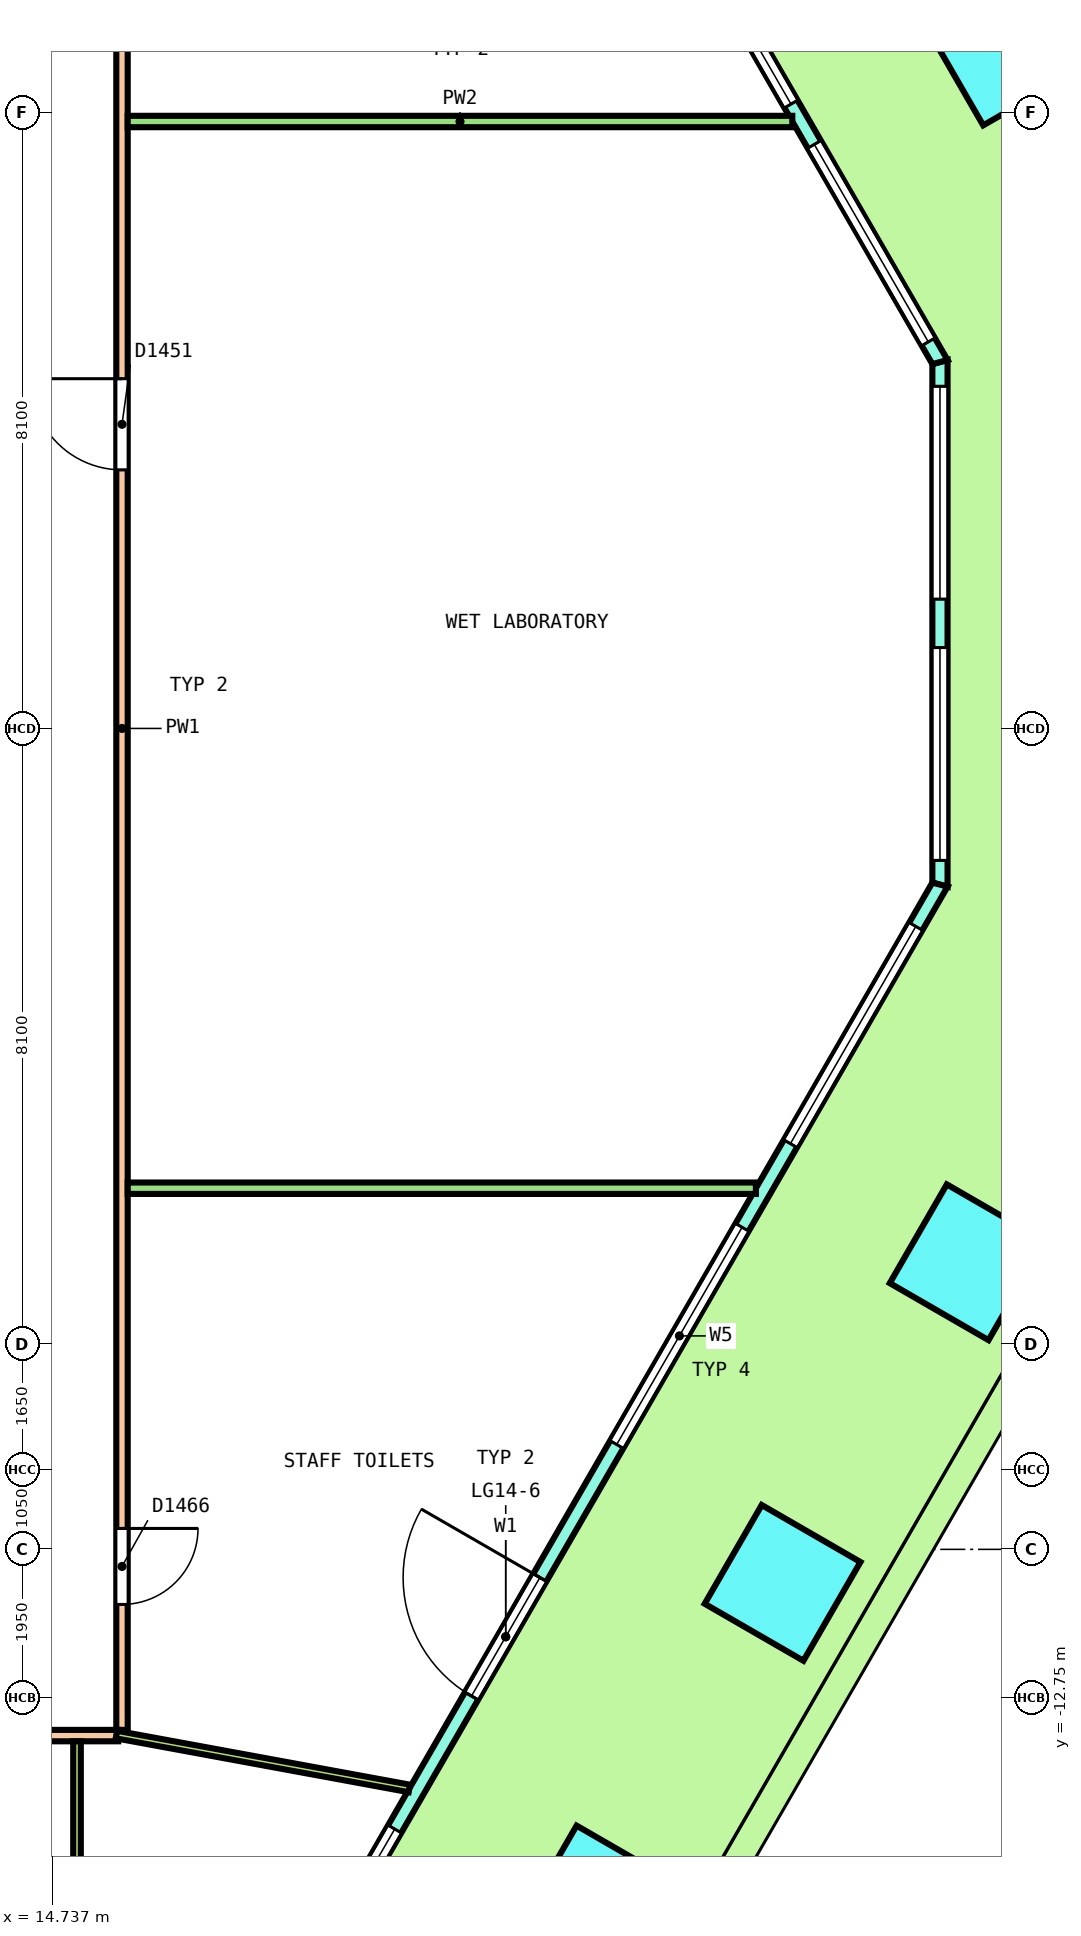
"""IFC4 building model, lengths in metres.
Left out: names, types, materials, properties, quantities, classifications, styles, units other than length and angle.
Written with IfcOpenShell. Run it as: python <this file> out.ifc"""

import sys

from ifc_helpers import new_model, si_unit, direction, frame, frame_2d, origin, origin_2d, place, context, subcontext, project, spatial, polyline, rectangle, outline, extrude, element, fill, save


model = new_model("IFC4")
c1 = context("Model", 3, precision=1e-05, world=origin(), true_north=direction((0.0, 1.0)))
c2 = subcontext(c1, "Body", "Model", "MODEL_VIEW")
j1 = project(units=[si_unit("LENGTHUNIT", "METRE"), si_unit("PLANEANGLEUNIT", "RADIAN")], contexts=[c1])
p1 = place(None, origin())
s1 = spatial("IfcSite", under=j1, at=p1, CompositionType="ELEMENT")
p2 = place(p1, origin())
s2 = spatial("IfcBuilding", under=s1, at=p2, CompositionType="ELEMENT")
p3 = place(p2, frame((0.0, 0.0, 63.0)))
s3 = spatial("IfcBuildingStorey", under=s2, at=p3, CompositionType="ELEMENT", Elevation=63.0)
p4 = place(p3, frame((27.255, 8.959, 0.0), z_axis=(0.0, 0.0, 1.0), x_axis=(-0.5, 0.866025403784, 0.0)))
e1 = element("IfcColumn", 1, at=p4, inside=s3, PredefinedType="COLUMN", context=c2, shape_type="SweptSolid", body=[
    extrude(rectangle(XDim=1.5, YDim=1.5, at=origin_2d()), origin(), (0.0, 0.0, 1.0), 4.04),
])
for number, where, z_axis, x_axis in (
    (2, (21.905, -15.459, 0.0), (0.0, 0.0, 1.0), (0.5, 0.866, 0.0)),
    (3, (24.341, -11.241, 0.0), (0.0, 0.0, 1.0), (0.5, 0.866, 0.0)),
):
    element("IfcColumn", number, at=place(p3, frame(where, z_axis=z_axis, x_axis=x_axis)), inside=s3, PredefinedType="COLUMN", context=c2, shape_type="SweptSolid", body=[
        extrude(rectangle(XDim=1.5, YDim=1.5, at=origin_2d()), origin(), (0.0, 0.0, 1.0), 4.05),
    ])
p5 = place(p3, frame((26.776, -7.023, 0.0), z_axis=(0.0, 0.0, 1.0), x_axis=(0.5, 0.866025403784, 0.0)))
e4 = element("IfcColumn", 4, at=p5, inside=s3, PredefinedType="COLUMN", context=c2, shape_type="SweptSolid", body=[
    extrude(rectangle(XDim=1.5, YDim=1.5, at=origin_2d()), origin(), (0.0, 0.0, 1.0), 4.04),
])
p6 = place(p3, frame((26.411, -2.055, 0.0), z_axis=(0.0, 0.0, 1.0), x_axis=(0.0, 1.0, 0.0)))
e5 = element("IfcWall", 5, at=p6, inside=s3, PredefinedType="SOLIDWALL", context=c2, shape_type="SweptSolid", body=[
    extrude(outline(polyline([(-0.027, -0.1), (1.128, -0.1), (2.283, -0.1), (3.438, -0.1), (4.592, -0.1), (5.747, -0.1), (6.902, -0.1), (6.848, 0.1), (5.711, 0.1), (4.574, 0.1), (3.438, 0.1), (2.301, 0.1), (1.164, 0.1), (0.027, 0.1), (-0.027, -0.1)])), origin(), (0.0, 0.0, 1.0), 4.1),
])
p7 = place(p6, frame((0.319, 0.0, 0.1)))
e6 = element("IfcOpeningElement", 6, at=p7, cuts=e5, PredefinedType="OPENING", context=c2, shape_type="SweptSolid", body=[
    extrude(rectangle(XDim=2.8, YDim=2.9, at=frame_2d((1.4, 1.45))), frame((0.0, 0.11, 0.0), z_axis=(0.0, -1.0, 0.0), x_axis=(1.0, 0.0, 0.0)), (0.0, 0.0, 1.0), 0.22),
])
p8 = place(p6, frame((3.756, 0.0, 0.1)))
e7 = element("IfcOpeningElement", 7, at=p8, cuts=e5, PredefinedType="OPENING", context=c2, shape_type="SweptSolid", body=[
    extrude(rectangle(XDim=2.8, YDim=2.9, at=frame_2d((1.4, 1.45))), frame((0.0, 0.11, 0.0), z_axis=(0.0, -1.0, 0.0), x_axis=(1.0, 0.0, 0.0)), (0.0, 0.0, 1.0), 0.22),
])
p9 = place(p3, frame((26.411, 4.82, 0.0), z_axis=(0.0, 0.0, 1.0), x_axis=(-0.500000137386, 0.866025324465, 0.0)))
e8 = element("IfcWall", 8, at=p9, inside=s3, PredefinedType="SOLIDWALL", context=c2, shape_type="SweptSolid", body=[
    extrude(outline(polyline([(-0.027, -0.1), (0.979, -0.1), (1.986, -0.1), (2.992, -0.1), (3.999, -0.1), (5.005, -0.1), (6.012, -0.1), (7.018, -0.1), (8.025, -0.1), (9.031, -0.1), (10.038, -0.1), (11.044, -0.1), (12.051, -0.1), (13.057, -0.1), (14.063, -0.1), (15.07, -0.1), (16.076, -0.1), (17.083, -0.1), (18.089, -0.1), (18.036, 0.1), (17.035, 0.1), (16.035, 0.1), (15.034, 0.1), (14.034, 0.1), (13.033, 0.1), (12.033, 0.1), (11.032, 0.1), (10.032, 0.1), (9.031, 0.1), (8.031, 0.1), (7.03, 0.1), (6.03, 0.1), (5.029, 0.1), (4.029, 0.1), (3.028, 0.1), (2.028, 0.1), (1.027, 0.1), (0.027, 0.1), (-0.027, -0.1)])), origin(), (0.0, 0.0, 1.0), 4.1),
])
p10 = place(p9, frame((0.306, 0.0, 0.1)))
e9 = element("IfcOpeningElement", 9, at=p10, cuts=e8, PredefinedType="OPENING", context=c2, shape_type="SweptSolid", body=[
    extrude(rectangle(XDim=3.0, YDim=2.9, at=frame_2d((1.5, 1.45))), frame((0.0, 0.11, 0.0), z_axis=(0.0, -1.0, 0.0), x_axis=(1.0, 0.0, 0.0)), (0.0, 0.0, 1.0), 0.22),
])
p11 = place(p9, frame((3.919, 0.0, 0.1)))
e10 = element("IfcOpeningElement", 10, at=p11, cuts=e8, PredefinedType="OPENING", context=c2, shape_type="SweptSolid", body=[
    extrude(rectangle(XDim=3.0, YDim=2.9, at=frame_2d((1.5, 1.45))), frame((0.0, 0.11, 0.0), z_axis=(0.0, -1.0, 0.0), x_axis=(1.0, 0.0, 0.0)), (0.0, 0.0, 1.0), 0.22),
])
p12 = place(p9, frame((8.131, 0.0, 0.0)))
e11 = element("IfcOpeningElement", 11, at=p12, cuts=e8, PredefinedType="OPENING", context=c2, shape_type="SweptSolid", body=[
    extrude(rectangle(XDim=1.8, YDim=2.4, at=frame_2d((0.9, 1.2))), frame((0.0, 0.11, 0.0), z_axis=(0.0, -1.0, 0.0), x_axis=(1.0, 0.0, 0.0)), (0.0, 0.0, 1.0), 0.22),
])
p13 = place(p9, frame((8.131, 0.0, 2.55)))
e12 = element("IfcOpeningElement", 12, at=p13, cuts=e8, PredefinedType="OPENING", context=c2, shape_type="SweptSolid", body=[
    extrude(rectangle(XDim=1.8, YDim=0.45, at=frame_2d((0.9, 0.225))), frame((0.0, 0.11, 0.0), z_axis=(0.0, -1.0, 0.0), x_axis=(1.0, 0.0, 0.0)), (0.0, 0.0, 1.0), 0.22),
])
p14 = place(p9, frame((11.144, 0.0, 0.1)))
e13 = element("IfcOpeningElement", 13, at=p14, cuts=e8, PredefinedType="OPENING", context=c2, shape_type="SweptSolid", body=[
    extrude(rectangle(XDim=3.0, YDim=2.9, at=frame_2d((1.5, 1.45))), frame((0.0, 0.11, 0.0), z_axis=(0.0, -1.0, 0.0), x_axis=(1.0, 0.0, 0.0)), (0.0, 0.0, 1.0), 0.22),
])
p15 = place(p9, frame((14.756, 0.0, 0.1)))
e14 = element("IfcOpeningElement", 14, at=p15, cuts=e8, PredefinedType="OPENING", context=c2, shape_type="SweptSolid", body=[
    extrude(rectangle(XDim=3.0, YDim=2.9, at=frame_2d((1.5, 1.45))), frame((0.0, 0.11, 0.0), z_axis=(0.0, -1.0, 0.0), x_axis=(1.0, 0.0, 0.0)), (0.0, 0.0, 1.0), 0.22),
])
p16 = place(p3, frame((14.985, -21.845, 0.0), z_axis=(0.0, 0.0, 1.0), x_axis=(0.50000204422, 0.86602422355, 0.0)))
e15 = element("IfcWall", 15, at=p16, inside=s3, PredefinedType="SOLIDWALL", context=c2, shape_type="SweptSolid", body=[
    extrude(outline(polyline([(-0.027, -0.1), (1.014, -0.1), (2.055, -0.1), (3.097, -0.1), (4.138, -0.1), (5.179, -0.1), (6.22, -0.1), (7.261, -0.1), (8.303, -0.1), (9.344, -0.1), (10.385, -0.1), (11.426, -0.1), (12.468, -0.1), (13.509, -0.1), (14.55, -0.1), (15.591, -0.1), (16.632, -0.1), (17.673, -0.1), (18.715, -0.1), (19.756, -0.1), (20.797, -0.1), (21.838, -0.1), (22.879, -0.1), (22.826, 0.1), (21.789, 0.1), (20.753, 0.1), (19.717, 0.1), (18.68, 0.1), (17.644, 0.1), (16.608, 0.1), (15.572, 0.1), (14.535, 0.1), (13.499, 0.1), (12.463, 0.1), (11.426, 0.1), (10.39, 0.1), (9.354, 0.1), (8.317, 0.1), (7.281, 0.1), (6.245, 0.1), (5.208, 0.1), (4.172, 0.1), (3.136, 0.1), (2.099, 0.1), (1.063, 0.1), (0.027, 0.1), (-0.027, -0.1)])), origin(), (0.0, 0.0, 1.0), 4.1),
])
p17 = place(p16, frame((0.635, 0.0, 0.1)))
e16 = element("IfcOpeningElement", 16, at=p17, cuts=e15, PredefinedType="OPENING", context=c2, shape_type="SweptSolid", body=[
    extrude(rectangle(XDim=3.3, YDim=2.9, at=frame_2d((1.65, 1.45))), frame((0.0, 0.11, 0.0), z_axis=(0.0, -1.0, 0.0), x_axis=(1.0, 0.0, 0.0)), (0.0, 0.0, 1.0), 0.22),
])
p18 = place(p16, frame((5.206, 0.0, 0.1)))
e17 = element("IfcOpeningElement", 17, at=p18, cuts=e15, PredefinedType="OPENING", context=c2, shape_type="SweptSolid", body=[
    extrude(rectangle(XDim=3.3, YDim=2.9, at=frame_2d((1.65, 1.45))), frame((0.0, 0.11, 0.0), z_axis=(0.0, -1.0, 0.0), x_axis=(1.0, 0.0, 0.0)), (0.0, 0.0, 1.0), 0.22),
])
p19 = place(p16, frame((10.526, 0.0, 0.0)))
e18 = element("IfcOpeningElement", 18, at=p19, cuts=e15, PredefinedType="OPENING", context=c2, shape_type="SweptSolid", body=[
    extrude(rectangle(XDim=1.8, YDim=2.4, at=frame_2d((0.9, 1.2))), frame((0.0, 0.11, 0.0), z_axis=(0.0, -1.0, 0.0), x_axis=(1.0, 0.0, 0.0)), (0.0, 0.0, 1.0), 0.22),
])
p20 = place(p16, frame((10.526, 0.0, 2.55)))
e19 = element("IfcOpeningElement", 19, at=p20, cuts=e15, PredefinedType="OPENING", context=c2, shape_type="SweptSolid", body=[
    extrude(rectangle(XDim=1.8, YDim=0.45, at=frame_2d((0.9, 0.225))), frame((0.0, 0.11, 0.0), z_axis=(0.0, -1.0, 0.0), x_axis=(1.0, 0.0, 0.0)), (0.0, 0.0, 1.0), 0.22),
])
p21 = place(p16, frame((14.347, 0.0, 0.1)))
e20 = element("IfcOpeningElement", 20, at=p21, cuts=e15, PredefinedType="OPENING", context=c2, shape_type="SweptSolid", body=[
    extrude(rectangle(XDim=3.3, YDim=2.9, at=frame_2d((1.65, 1.45))), frame((0.0, 0.11, 0.0), z_axis=(0.0, -1.0, 0.0), x_axis=(1.0, 0.0, 0.0)), (0.0, 0.0, 1.0), 0.22),
])
p22 = place(p16, frame((18.917, 0.0, 0.1)))
e21 = element("IfcOpeningElement", 21, at=p22, cuts=e15, PredefinedType="OPENING", context=c2, shape_type="SweptSolid", body=[
    extrude(rectangle(XDim=3.3, YDim=2.9, at=frame_2d((1.65, 1.45))), frame((0.0, 0.11, 0.0), z_axis=(0.0, -1.0, 0.0), x_axis=(1.0, 0.0, 0.0)), (0.0, 0.0, 1.0), 0.22),
])
p23 = place(p3, frame((15.65, -13.175, 0.0), z_axis=(0.0, 0.0, 1.0), x_axis=(0.0, 1.0, 0.0)))
e22 = element("IfcWall", 22, at=p23, inside=s3, PredefinedType="PARTITIONING", context=c2, shape_type="SweptSolid", body=[
    extrude(rectangle(XDim=26.35, YDim=0.15, at=frame_2d((13.175, 0.0))), origin(), (0.0, 0.0, 1.0), 3.05),
])
p24 = place(p23, frame((16.576, 0.0, 0.0)))
e23 = element("IfcOpeningElement", 23, at=p24, cuts=e22, PredefinedType="OPENING", context=c2, shape_type="SweptSolid", body=[
    extrude(rectangle(XDim=1.2, YDim=2.1, at=frame_2d((0.6, 1.05))), frame((0.0, 0.085, 0.0), z_axis=(0.0, -1.0, 0.0), x_axis=(1.0, 0.0, 0.0)), (0.0, 0.0, 1.0), 0.17),
])
p25 = place(p23, frame((22.401, 0.0, 0.0)))
e24 = element("IfcOpeningElement", 24, at=p25, cuts=e22, PredefinedType="OPENING", context=c2, shape_type="SweptSolid", body=[
    extrude(rectangle(XDim=1.0, YDim=2.1, at=frame_2d((0.5, 1.05))), frame((0.0, 0.085, 0.0), z_axis=(0.0, -1.0, 0.0), x_axis=(1.0, 0.0, 0.0)), (0.0, 0.0, 1.0), 0.17),
])
p26 = place(p23, frame((1.65, 0.0, 0.0)))
e25 = element("IfcOpeningElement", 25, at=p26, cuts=e22, PredefinedType="OPENING", context=c2, shape_type="SweptSolid", body=[
    extrude(rectangle(XDim=1.0, YDim=2.1, at=frame_2d((0.5, 1.05))), frame((0.0, 0.085, 0.0), z_axis=(0.0, -1.0, 0.0), x_axis=(1.0, 0.0, 0.0)), (0.0, 0.0, 1.0), 0.17),
])
p27 = place(p3, frame((-15.725, -13.25, 0.0), z_axis=(0.0, 0.0, 1.0), x_axis=(1.0, 0.0, 0.0)))
e26 = element("IfcWall", 26, at=p27, inside=s3, PredefinedType="PARTITIONING", context=c2, shape_type="SweptSolid", body=[
    extrude(rectangle(XDim=31.325, YDim=0.15, at=frame_2d((15.663, 0.0))), origin(), (0.0, 0.0, 1.0), 3.05),
])
p28 = place(p27, frame((0.898, 0.0, 0.0)))
e27 = element("IfcOpeningElement", 27, at=p28, cuts=e26, PredefinedType="OPENING", context=c2, shape_type="SweptSolid", body=[
    extrude(rectangle(XDim=1.0, YDim=2.1, at=frame_2d((0.5, 1.05))), frame((0.0, 0.085, 0.0), z_axis=(0.0, -1.0, 0.0), x_axis=(1.0, 0.0, 0.0)), (0.0, 0.0, 1.0), 0.17),
])
p29 = place(p27, frame((5.198, 0.0, 0.0)))
e28 = element("IfcOpeningElement", 28, at=p29, cuts=e26, PredefinedType="OPENING", context=c2, shape_type="SweptSolid", body=[
    extrude(rectangle(XDim=1.2, YDim=2.1, at=frame_2d((0.6, 1.05))), frame((0.0, 0.085, 0.0), z_axis=(0.0, -1.0, 0.0), x_axis=(1.0, 0.0, 0.0)), (0.0, 0.0, 1.0), 0.17),
])
p30 = place(p27, frame((14.115, 0.0, 0.0)))
e29 = element("IfcOpeningElement", 29, at=p30, cuts=e26, PredefinedType="OPENING", context=c2, shape_type="SweptSolid", body=[
    extrude(rectangle(XDim=1.2, YDim=2.1, at=frame_2d((0.6, 1.05))), frame((0.0, 0.085, 0.0), z_axis=(0.0, -1.0, 0.0), x_axis=(1.0, 0.0, 0.0)), (0.0, 0.0, 1.0), 0.17),
])
p31 = place(p27, frame((22.046, 0.0, 0.0)))
e30 = element("IfcOpeningElement", 30, at=p31, cuts=e26, PredefinedType="OPENING", context=c2, shape_type="SweptSolid", body=[
    extrude(rectangle(XDim=1.0, YDim=2.1, at=frame_2d((0.5, 1.05))), frame((0.0, 0.085, 0.0), z_axis=(0.0, -1.0, 0.0), x_axis=(1.0, 0.0, 0.0)), (0.0, 0.0, 1.0), 0.17),
])
p32 = place(p27, frame((28.358, 0.0, 0.0)))
e31 = element("IfcOpeningElement", 31, at=p32, cuts=e26, PredefinedType="OPENING", context=c2, shape_type="SweptSolid", body=[
    extrude(rectangle(XDim=1.0, YDim=2.1, at=frame_2d((0.5, 1.05))), frame((0.0, 0.085, 0.0), z_axis=(0.0, -1.0, 0.0), x_axis=(1.0, 0.0, 0.0)), (0.0, 0.0, 1.0), 0.17),
])
p33 = place(p3, frame((15.725, 7.985, 0.0), z_axis=(0.0, 0.0, 1.0), x_axis=(1.0, 0.0, 0.0)))
e32 = element("IfcWall", 32, at=p33, inside=s3, PredefinedType="PARTITIONING", context=c2, shape_type="SweptSolid", body=[
    extrude(rectangle(XDim=8.743, YDim=0.15, at=frame_2d((4.372, 0.0))), origin(), (0.0, 0.0, 1.0), 3.05),
])
p34 = place(p3, frame((15.725, -6.049, 0.0), z_axis=(0.0, 0.0, 1.0), x_axis=(1.0, 0.0, 0.0)))
e33 = element("IfcWall", 33, at=p34, inside=s3, PredefinedType="PARTITIONING", context=c2, shape_type="SweptSolid", body=[
    extrude(rectangle(XDim=8.264, YDim=0.15, at=frame_2d((4.132, 0.0))), origin(), (0.0, 0.0, 1.0), 3.05),
])
p35 = place(p3, frame((15.058, -21.519, 0.0), z_axis=(0.0, 0.0, 1.0), x_axis=(0.0, 1.0, 0.0)))
e34 = element("IfcWall", 34, at=p35, inside=s3, PredefinedType="PARTITIONING", context=c2, shape_type="SweptSolid", body=[
    extrude(rectangle(XDim=8.194, YDim=0.1, at=frame_2d((4.097, 0.0))), origin(), (0.0, 0.0, 1.0), 3.05),
])
p36 = place(p35, frame((2.649, 0.0, 0.0)))
e35 = element("IfcOpeningElement", 35, at=p36, cuts=e34, PredefinedType="OPENING", context=c2, shape_type="SweptSolid", body=[
    extrude(rectangle(XDim=1.0, YDim=2.1, at=frame_2d((0.5, 1.05))), frame((0.0, 0.06, 0.0), z_axis=(0.0, -1.0, 0.0), x_axis=(1.0, 0.0, 0.0)), (0.0, 0.0, 1.0), 0.12),
])
p37 = place(p3, frame((15.576, -13.236, 0.0), z_axis=(0.0, 0.0, 1.0), x_axis=(0.983499014775, -0.18091348191, 0.0)))
e36 = element("IfcWall", 36, at=p37, inside=s3, PredefinedType="PARTITIONING", context=c2, shape_type="SweptSolid", body=[
    extrude(rectangle(XDim=3.919, YDim=0.1, at=frame_2d((1.959, 0.0))), origin(), (0.0, 0.0, 1.0), 3.05),
])
p38 = place(p7, origin())
e37 = element("IfcWindow", 37, at=p38, inside=s3, PartitioningType="SINGLE_PANEL", PredefinedType="WINDOW", context=c2, shape_type="SweptSolid", body=[
    extrude(rectangle(XDim=2.8, YDim=2.9, at=frame_2d((1.4, 1.45))), frame((0.0, 0.03, 0.0), z_axis=(0.0, -1.0, 0.0), x_axis=(1.0, 0.0, 0.0)), (0.0, 0.0, 1.0), 0.06),
])
fill(e6, e37)
p39 = place(p8, origin())
e38 = element("IfcWindow", 38, at=p39, inside=s3, PartitioningType="SINGLE_PANEL", PredefinedType="WINDOW", context=c2, shape_type="SweptSolid", body=[
    extrude(rectangle(XDim=2.8, YDim=2.9, at=frame_2d((1.4, 1.45))), frame((0.0, 0.03, 0.0), z_axis=(0.0, -1.0, 0.0), x_axis=(1.0, 0.0, 0.0)), (0.0, 0.0, 1.0), 0.06),
])
fill(e7, e38)
p40 = place(p10, origin())
e39 = element("IfcWindow", 39, at=p40, inside=s3, PartitioningType="SINGLE_PANEL", PredefinedType="WINDOW", context=c2, shape_type="SweptSolid", body=[
    extrude(rectangle(XDim=3.0, YDim=2.9, at=frame_2d((1.5, 1.45))), frame((0.0, 0.03, 0.0), z_axis=(0.0, -1.0, 0.0), x_axis=(1.0, 0.0, 0.0)), (0.0, 0.0, 1.0), 0.06),
])
fill(e9, e39)
p41 = place(p11, origin())
e40 = element("IfcWindow", 40, at=p41, inside=s3, PartitioningType="SINGLE_PANEL", PredefinedType="WINDOW", context=c2, shape_type="SweptSolid", body=[
    extrude(rectangle(XDim=3.0, YDim=2.9, at=frame_2d((1.5, 1.45))), frame((0.0, 0.03, 0.0), z_axis=(0.0, -1.0, 0.0), x_axis=(1.0, 0.0, 0.0)), (0.0, 0.0, 1.0), 0.06),
])
fill(e10, e40)
p42 = place(p18, origin())
e41 = element("IfcWindow", 41, at=p42, inside=s3, PartitioningType="SINGLE_PANEL", PredefinedType="WINDOW", context=c2, shape_type="SweptSolid", body=[
    extrude(rectangle(XDim=3.3, YDim=2.9, at=frame_2d((1.65, 1.45))), frame((0.0, 0.03, 0.0), z_axis=(0.0, -1.0, 0.0), x_axis=(1.0, 0.0, 0.0)), (0.0, 0.0, 1.0), 0.06),
])
fill(e17, e41)
p43 = place(p19, origin())
e42 = element("IfcDoor", 42, at=p43, inside=s3, OperationType="DOUBLE_DOOR_SINGLE_SWING", PredefinedType="DOOR", context=c2, shape_type="SweptSolid", body=[
    extrude(rectangle(XDim=1.8, YDim=2.4, at=frame_2d((0.9, 1.2))), frame((0.0, 0.025, 0.0), z_axis=(0.0, -1.0, 0.0), x_axis=(1.0, 0.0, 0.0)), (0.0, 0.0, 1.0), 0.05),
])
fill(e18, e42)
p44 = place(p20, origin())
e43 = element("IfcWindow", 43, at=p44, inside=s3, PartitioningType="SINGLE_PANEL", PredefinedType="WINDOW", context=c2, shape_type="SweptSolid", body=[
    extrude(rectangle(XDim=1.8, YDim=0.45, at=frame_2d((0.9, 0.225))), frame((0.0, 0.03, 0.0), z_axis=(0.0, -1.0, 0.0), x_axis=(1.0, 0.0, 0.0)), (0.0, 0.0, 1.0), 0.06),
])
fill(e19, e43)
p45 = place(p21, origin())
e44 = element("IfcWindow", 44, at=p45, inside=s3, PartitioningType="SINGLE_PANEL", PredefinedType="WINDOW", context=c2, shape_type="SweptSolid", body=[
    extrude(rectangle(XDim=3.3, YDim=2.9, at=frame_2d((1.65, 1.45))), frame((0.0, 0.03, 0.0), z_axis=(0.0, -1.0, 0.0), x_axis=(1.0, 0.0, 0.0)), (0.0, 0.0, 1.0), 0.06),
])
fill(e20, e44)
p46 = place(p22, origin())
e45 = element("IfcWindow", 45, at=p46, inside=s3, PartitioningType="SINGLE_PANEL", PredefinedType="WINDOW", context=c2, shape_type="SweptSolid", body=[
    extrude(rectangle(XDim=3.3, YDim=2.9, at=frame_2d((1.65, 1.45))), frame((0.0, 0.03, 0.0), z_axis=(0.0, -1.0, 0.0), x_axis=(1.0, 0.0, 0.0)), (0.0, 0.0, 1.0), 0.06),
])
fill(e21, e45)
p47 = place(p24, origin())
e46 = element("IfcDoor", 46, at=p47, inside=s3, OperationType="DOUBLE_DOOR_SINGLE_SWING", PredefinedType="DOOR", context=c2, shape_type="SweptSolid", body=[
    extrude(rectangle(XDim=1.2, YDim=2.1, at=frame_2d((0.6, 1.05))), frame((0.0, 0.025, 0.0), z_axis=(0.0, -1.0, 0.0), x_axis=(1.0, 0.0, 0.0)), (0.0, 0.0, 1.0), 0.05),
])
fill(e23, e46)
p48 = place(p26, origin())
e47 = element("IfcDoor", 47, at=p48, inside=s3, OperationType="SINGLE_SWING_RIGHT", PredefinedType="DOOR", context=c2, shape_type="SweptSolid", body=[
    extrude(rectangle(XDim=1.0, YDim=2.1, at=frame_2d((0.5, 1.05))), frame((0.0, 0.025, 0.0), z_axis=(0.0, -1.0, 0.0), x_axis=(1.0, 0.0, 0.0)), (0.0, 0.0, 1.0), 0.05),
])
fill(e25, e47)
save(model, sys.argv[1])
